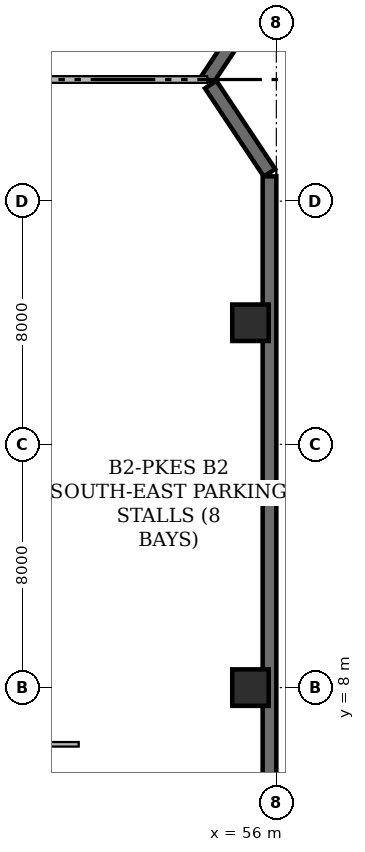
"""IFC4 building model, lengths in metres.
Left out: names, types, materials, properties, quantities, classifications, styles, units other than length and angle.
Written with IfcOpenShell. Run it as: python <this file> out.ifc"""

import sys

from ifc_helpers import new_model, si_unit, direction, frame, frame_2d, origin, origin_2d, place, context, subcontext, project, spatial, rectangle, hollow_rectangle, extrude, element, save


model = new_model("IFC4")
c1 = context("Model", 3, precision=1e-05, world=origin(), true_north=direction((0.0, 1.0)))
c2 = subcontext(c1, "Body", "Model", "MODEL_VIEW")
j1 = project(units=[si_unit("LENGTHUNIT", "METRE"), si_unit("PLANEANGLEUNIT", "RADIAN")], contexts=[c1])
p1 = place(None, origin())
s1 = spatial("IfcSite", under=j1, at=p1, CompositionType="ELEMENT")
p2 = place(p1, origin())
s2 = spatial("IfcBuilding", under=s1, at=p2, CompositionType="ELEMENT")
p3 = place(p2, frame((0.0, 0.0, -9.0)))
s3 = spatial("IfcBuildingStorey", under=s2, at=p3, CompositionType="ELEMENT", Elevation=-9.0)
for number, where, z_axis, x_axis in (
    (1, (55.15, 8.0, 0.0), (0.0, 0.0, 1.0), (1.0, 0.0, 0.0)),
    (2, (55.15, 20.0, 0.0), (0.0, 0.0, 1.0), (1.0, 0.0, 0.0)),
):
    element("IfcColumn", number, at=place(p3, frame(where, z_axis=z_axis, x_axis=x_axis)), inside=s3, PredefinedType="COLUMN", context=c2, shape_type="SweptSolid", body=[
        extrude(hollow_rectangle(XDim=1.2, YDim=1.2, WallThickness=0.06, at=origin_2d()), origin(), (0.0, 0.0, 1.0), 4.5),
    ])
p4 = place(p3, frame((55.71, 30.971, 0.0), z_axis=(0.0, 0.0, 1.0), x_axis=(-0.554573947075, -0.832134446604, 0.0)))
e3 = element("IfcWall", 3, at=p4, inside=s3, PredefinedType="USERDEFINED", context=c2, shape_type="SweptSolid", body=[
    extrude(rectangle(XDim=3.57, YDim=0.45, at=frame_2d((1.785, 0.0))), origin(), (0.0, 0.0, 1.0), 4.18),
])
p5 = place(p3, frame((53.84, 27.835, 0.0), z_axis=(0.0, 0.0, 1.0), x_axis=(0.554587147378, -0.832125649144, 0.0)))
e4 = element("IfcWall", 4, at=p5, inside=s3, PredefinedType="USERDEFINED", context=c2, shape_type="SweptSolid", body=[
    extrude(rectangle(XDim=3.489, YDim=0.45, at=frame_2d((1.744, 0.0))), origin(), (0.0, 0.0, 1.0), 4.18),
])
p6 = place(p3, frame((55.775, 24.816, 0.0), z_axis=(0.0, 0.0, 1.0), x_axis=(0.0, -1.0, 0.0)))
e5 = element("IfcWall", 5, at=p6, inside=s3, PredefinedType="USERDEFINED", context=c2, shape_type="SweptSolid", body=[
    extrude(rectangle(XDim=19.723, YDim=0.45, at=frame_2d((9.861, 0.0))), origin(), (0.0, 0.0, 1.0), 4.18),
])
p7 = place(p3, frame((42.735, 28.0, 0.0), z_axis=(0.0, 0.0, 1.0), x_axis=(1.0, 0.0, 0.0)))
e6 = element("IfcWall", 6, at=p7, inside=s3, PredefinedType="STANDARD", context=c2, shape_type="SweptSolid", body=[
    extrude(rectangle(XDim=10.988, YDim=0.22, at=frame_2d((5.494, 0.0))), origin(), (0.0, 0.0, 1.0), 4.18),
])
p8 = place(p7, frame((1.8, 0.0, 0.0)))
e7 = element("IfcOpeningElement", 7, at=p8, cuts=e6, PredefinedType="OPENING", context=c2, shape_type="SweptSolid", body=[
    extrude(rectangle(XDim=3.2, YDim=2.7, at=frame_2d((1.6, 1.35))), frame((0.0, 0.12, 0.0), z_axis=(0.0, -1.0, 0.0), x_axis=(1.0, 0.0, 0.0)), (0.0, 0.0, 1.0), 0.24),
])
p9 = place(p3, frame((49.5, 6.135, 0.0), z_axis=(0.0, 0.0, 1.0), x_axis=(-1.0, 0.0, 0.0)))
e8 = element("IfcWall", 8, at=p9, inside=s3, PredefinedType="STANDARD", context=c2, shape_type="SweptSolid", body=[
    extrude(rectangle(XDim=8.178, YDim=0.15, at=frame_2d((4.089, 0.0))), origin(), (0.0, 0.0, 1.0), 3.315),
])
p10 = place(p9, frame((3.467, 0.0, 0.0)))
e9 = element("IfcOpeningElement", 9, at=p10, cuts=e8, PredefinedType="OPENING", context=c2, shape_type="SweptSolid", body=[
    extrude(rectangle(XDim=1.2, YDim=2.15, at=frame_2d((0.6, 1.075))), frame((0.0, 0.085, 0.0), z_axis=(0.0, -1.0, 0.0), x_axis=(1.0, 0.0, 0.0)), (0.0, 0.0, 1.0), 0.17),
])
save(model, sys.argv[1])
